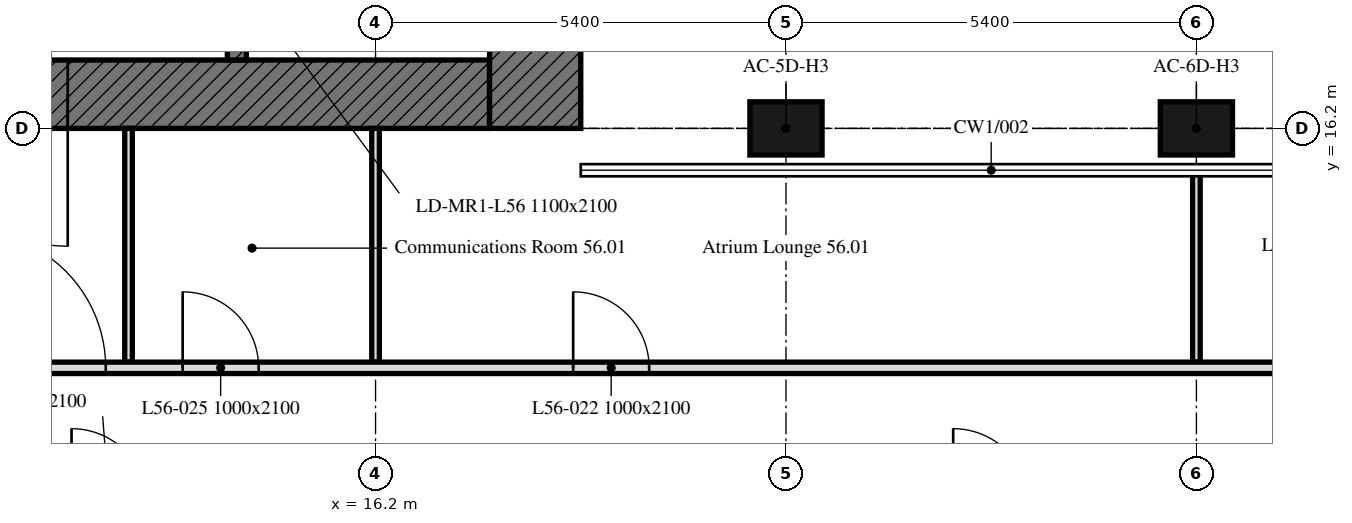
"""IFC4 building model, lengths in metres.
Left out: names, types, materials, properties, quantities, classifications, styles, units other than length and angle.
Written with IfcOpenShell. Run it as: python <this file> out.ifc"""

import sys

from ifc_helpers import new_model, si_unit, direction, frame, frame_2d, origin, origin_2d, place, context, subcontext, project, spatial, rectangle, extrude, element, fill, save


model = new_model("IFC4")
c1 = context("Model", 3, precision=1e-05, world=origin(), true_north=direction((0.0, 1.0)))
c2 = subcontext(c1, "Body", "Model", "MODEL_VIEW")
j1 = project(units=[si_unit("LENGTHUNIT", "METRE"), si_unit("PLANEANGLEUNIT", "RADIAN")], contexts=[c1])
p1 = place(None, origin())
s1 = spatial("IfcSite", under=j1, at=p1, CompositionType="ELEMENT")
p2 = place(p1, origin())
s2 = spatial("IfcBuilding", under=s1, at=p2, CompositionType="ELEMENT")
p3 = place(p2, frame((0.0, 0.0, 223.6)))
s3 = spatial("IfcBuildingStorey", under=s2, at=p3, CompositionType="ELEMENT", Elevation=223.6)
for number, where, z_axis, x_axis in (
    (1, (21.6, 16.2, 0.0), (0.0, 0.0, 1.0), (1.0, 0.0, 0.0)),
    (2, (27.0, 16.2, 0.0), (0.0, 0.0, 1.0), (1.0, 0.0, 0.0)),
):
    element("IfcColumn", number, at=place(p3, frame(where, z_axis=z_axis, x_axis=x_axis)), inside=s3, PredefinedType="COLUMN", context=c2, shape_type="SweptSolid", body=[
        extrude(rectangle(XDim=0.95, YDim=0.7, at=origin_2d()), origin(), (0.0, 0.0, 1.0), 3.0),
    ])
p4 = place(p3, frame((17.7, 16.65, 0.0), z_axis=(0.0, 0.0, 1.0), x_axis=(-1.0, 0.0, 0.0)))
e3 = element("IfcWall", 3, at=p4, inside=s3, PredefinedType="SOLIDWALL", context=c2, shape_type="SweptSolid", body=[
    extrude(rectangle(XDim=11.1, YDim=0.9, at=frame_2d((5.55, 0.0))), origin(), (0.0, 0.0, 1.0), 3.0),
])
p5 = place(p4, frame((5.55, 0.0, 0.0)))
e4 = element("IfcOpeningElement", 4, at=p5, cuts=e3, PredefinedType="OPENING", context=c2, shape_type="SweptSolid", body=[
    extrude(rectangle(XDim=2.0, YDim=2.4, at=frame_2d((1.0, 1.2))), frame((0.0, 0.45, 0.0), z_axis=(0.0, -1.0, 0.0), x_axis=(1.0, 0.0, 0.0)), (0.0, 0.0, 1.0), 0.9),
])
p6 = place(p3, frame((18.3, 32.4, 0.0), z_axis=(0.0, 0.0, 1.0), x_axis=(0.0, -1.0, 0.0)))
e5 = element("IfcWall", 5, at=p6, inside=s3, PredefinedType="SOLIDWALL", context=c2, shape_type="SweptSolid", body=[
    extrude(rectangle(XDim=16.2, YDim=1.2, at=frame_2d((8.1, 0.0))), origin(), (0.0, 0.0, 1.0), 3.0),
])
p7 = place(p3, frame((14.375, 17.1, 0.0), z_axis=(0.0, 0.0, 1.0), x_axis=(0.0, 1.0, 0.0)))
e6 = element("IfcWall", 6, at=p7, inside=s3, PredefinedType="SOLIDWALL", context=c2, shape_type="SweptSolid", body=[
    extrude(rectangle(XDim=14.4, YDim=0.25, at=frame_2d((7.2, 0.0))), origin(), (0.0, 0.0, 1.0), 3.0),
])
p8 = place(p7, frame((13.15, 0.0, 0.0)))
e7 = element("IfcOpeningElement", 7, at=p8, cuts=e6, PredefinedType="OPENING", context=c2, shape_type="SweptSolid", body=[
    extrude(rectangle(XDim=1.0, YDim=2.1, at=frame_2d((0.5, 1.05))), frame((0.0, 0.125, 0.0), z_axis=(0.0, -1.0, 0.0), x_axis=(1.0, 0.0, 0.0)), (0.0, 0.0, 1.0), 0.25),
])
p9 = place(p7, frame((0.6, 0.0, 0.0)))
e8 = element("IfcOpeningElement", 8, at=p9, cuts=e6, PredefinedType="OPENING", context=c2, shape_type="SweptSolid", body=[
    extrude(rectangle(XDim=1.1, YDim=2.1, at=frame_2d((0.55, 1.05))), frame((0.0, 0.125, 0.0), z_axis=(0.0, -1.0, 0.0), x_axis=(1.0, 0.0, 0.0)), (0.0, 0.0, 1.0), 0.25),
])
p10 = place(p7, frame((3.25, 0.0, 0.0)))
e9 = element("IfcOpeningElement", 9, at=p10, cuts=e6, PredefinedType="OPENING", context=c2, shape_type="SweptSolid", body=[
    extrude(rectangle(XDim=0.9, YDim=2.1, at=frame_2d((0.45, 1.05))), frame((0.0, 0.125, 0.0), z_axis=(0.0, -1.0, 0.0), x_axis=(1.0, 0.0, 0.0)), (0.0, 0.0, 1.0), 0.25),
])
p11 = place(p3, frame((27.0, 15.705, 0.0), z_axis=(0.0, 0.0, 1.0), x_axis=(0.0, -1.0, 0.0)))
e10 = element("IfcWall", 10, at=p11, inside=s3, PredefinedType="PARTITIONING", context=c2, shape_type="SweptSolid", body=[
    extrude(rectangle(XDim=2.58, YDim=0.1, at=frame_2d((1.29, 0.0))), origin(), (0.0, 0.0, 1.0), 3.0),
])
for number, where, z_axis, x_axis in (
    (11, (16.2, 16.2, 0.0), (0.0, 0.0, 1.0), (0.0, -1.0, 0.0)),
    (12, (12.95, 13.125, 0.0), (0.0, 0.0, 1.0), (0.0, 1.0, 0.0)),
):
    element("IfcWall", number, at=place(p3, frame(where, z_axis=z_axis, x_axis=x_axis)), inside=s3, PredefinedType="PARTITIONING", context=c2, shape_type="SweptSolid", body=[
        extrude(rectangle(XDim=3.075, YDim=0.1, at=frame_2d((1.538, 0.0))), origin(), (0.0, 0.0, 1.0), 3.0),
    ])
p12 = place(p3, frame((5.325, 13.05, 0.0), z_axis=(0.0, 0.0, 1.0), x_axis=(1.0, 0.0, 0.0)))
e13 = element("IfcWall", 13, at=p12, inside=s3, PredefinedType="PARTITIONING", context=c2, shape_type="SweptSolid", body=[
    extrude(rectangle(XDim=37.124, YDim=0.15, at=frame_2d((18.562, 0.0))), origin(), (0.0, 0.0, 1.0), 3.0),
])
p13 = place(p12, frame((23.875, 0.0, 0.0)))
e14 = element("IfcOpeningElement", 14, at=p13, cuts=e13, PredefinedType="OPENING", context=c2, shape_type="SweptSolid", body=[
    extrude(rectangle(XDim=1.0, YDim=2.1, at=frame_2d((0.5, 1.05))), frame((0.0, 0.075, 0.0), z_axis=(0.0, -1.0, 0.0), x_axis=(1.0, 0.0, 0.0)), (0.0, 0.0, 1.0), 0.15),
])
p14 = place(p12, frame((13.475, 0.0, 0.0)))
e15 = element("IfcOpeningElement", 15, at=p14, cuts=e13, PredefinedType="OPENING", context=c2, shape_type="SweptSolid", body=[
    extrude(rectangle(XDim=1.0, YDim=2.1, at=frame_2d((0.5, 1.05))), frame((0.0, 0.075, 0.0), z_axis=(0.0, -1.0, 0.0), x_axis=(1.0, 0.0, 0.0)), (0.0, 0.0, 1.0), 0.15),
])
p15 = place(p12, frame((34.095, 0.0, 0.0)))
e16 = element("IfcOpeningElement", 16, at=p15, cuts=e13, PredefinedType="OPENING", context=c2, shape_type="SweptSolid", body=[
    extrude(rectangle(XDim=1.0, YDim=2.1, at=frame_2d((0.5, 1.05))), frame((0.0, 0.075, 0.0), z_axis=(0.0, -1.0, 0.0), x_axis=(1.0, 0.0, 0.0)), (0.0, 0.0, 1.0), 0.15),
])
p16 = place(p12, frame((8.337, 0.0, 0.0)))
e17 = element("IfcOpeningElement", 17, at=p16, cuts=e13, PredefinedType="OPENING", context=c2, shape_type="SweptSolid", body=[
    extrude(rectangle(XDim=1.0, YDim=2.1, at=frame_2d((0.5, 1.05))), frame((0.0, 0.075, 0.0), z_axis=(0.0, -1.0, 0.0), x_axis=(1.0, 0.0, 0.0)), (0.0, 0.0, 1.0), 0.15),
])
p17 = place(p12, frame((1.648, 0.0, 0.0)))
e18 = element("IfcOpeningElement", 18, at=p17, cuts=e13, PredefinedType="OPENING", context=c2, shape_type="SweptSolid", body=[
    extrude(rectangle(XDim=1.0, YDim=2.1, at=frame_2d((0.5, 1.05))), frame((0.0, 0.075, 0.0), z_axis=(0.0, -1.0, 0.0), x_axis=(1.0, 0.0, 0.0)), (0.0, 0.0, 1.0), 0.15),
])
p18 = place(p12, frame((28.613, 0.0, 0.0)))
e19 = element("IfcOpeningElement", 19, at=p18, cuts=e13, PredefinedType="OPENING", context=c2, shape_type="SweptSolid", body=[
    extrude(rectangle(XDim=1.0, YDim=2.1, at=frame_2d((0.5, 1.05))), frame((0.0, 0.075, 0.0), z_axis=(0.0, -1.0, 0.0), x_axis=(1.0, 0.0, 0.0)), (0.0, 0.0, 1.0), 0.15),
])
p19 = place(p12, frame((30.625, 0.0, 0.0)))
e20 = element("IfcOpeningElement", 20, at=p19, cuts=e13, PredefinedType="OPENING", context=c2, shape_type="SweptSolid", body=[
    extrude(rectangle(XDim=1.8, YDim=2.4, at=frame_2d((0.9, 1.2))), frame((0.0, 0.075, 0.0), z_axis=(0.0, -1.0, 0.0), x_axis=(1.0, 0.0, 0.0)), (0.0, 0.0, 1.0), 0.15),
])
p20 = place(p12, frame((5.525, 0.0, 0.0)))
e21 = element("IfcOpeningElement", 21, at=p20, cuts=e13, PredefinedType="OPENING", context=c2, shape_type="SweptSolid", body=[
    extrude(rectangle(XDim=1.8, YDim=2.4, at=frame_2d((0.9, 1.2))), frame((0.0, 0.075, 0.0), z_axis=(0.0, -1.0, 0.0), x_axis=(1.0, 0.0, 0.0)), (0.0, 0.0, 1.0), 0.15),
])
p21 = place(p5, origin())
e22 = element("IfcDoor", 22, at=p21, inside=s3, OperationType="DOUBLE_DOOR_SINGLE_SWING", PredefinedType="DOOR", context=c2, shape_type="SweptSolid", body=[
    extrude(rectangle(XDim=2.0, YDim=2.4, at=frame_2d((1.0, 1.2))), frame((0.0, 0.025, 0.0), z_axis=(0.0, -1.0, 0.0), x_axis=(1.0, 0.0, 0.0)), (0.0, 0.0, 1.0), 0.05),
])
fill(e4, e22)
p22 = place(p14, origin())
e23 = element("IfcDoor", 23, at=p22, inside=s3, OperationType="SINGLE_SWING_LEFT", PredefinedType="DOOR", context=c2, shape_type="SweptSolid", body=[
    extrude(rectangle(XDim=1.0, YDim=2.1, at=frame_2d((0.5, 1.05))), frame((0.0, 0.025, 0.0), z_axis=(0.0, -1.0, 0.0), x_axis=(1.0, 0.0, 0.0)), (0.0, 0.0, 1.0), 0.05),
])
fill(e15, e23)
p23 = place(p16, origin())
e24 = element("IfcDoor", 24, at=p23, inside=s3, OperationType="SINGLE_SWING_LEFT", PredefinedType="DOOR", context=c2, shape_type="SweptSolid", body=[
    extrude(rectangle(XDim=1.0, YDim=2.1, at=frame_2d((0.5, 1.05))), frame((0.0, 0.025, 0.0), z_axis=(0.0, -1.0, 0.0), x_axis=(1.0, 0.0, 0.0)), (0.0, 0.0, 1.0), 0.05),
])
fill(e17, e24)
p24 = place(p20, origin())
e25 = element("IfcDoor", 25, at=p24, inside=s3, OperationType="DOUBLE_DOOR_SINGLE_SWING", PredefinedType="DOOR", context=c2, shape_type="SweptSolid", body=[
    extrude(rectangle(XDim=1.8, YDim=2.4, at=frame_2d((0.9, 1.2))), frame((0.0, 0.025, 0.0), z_axis=(0.0, -1.0, 0.0), x_axis=(1.0, 0.0, 0.0)), (0.0, 0.0, 1.0), 0.05),
])
fill(e21, e25)
save(model, sys.argv[1])
